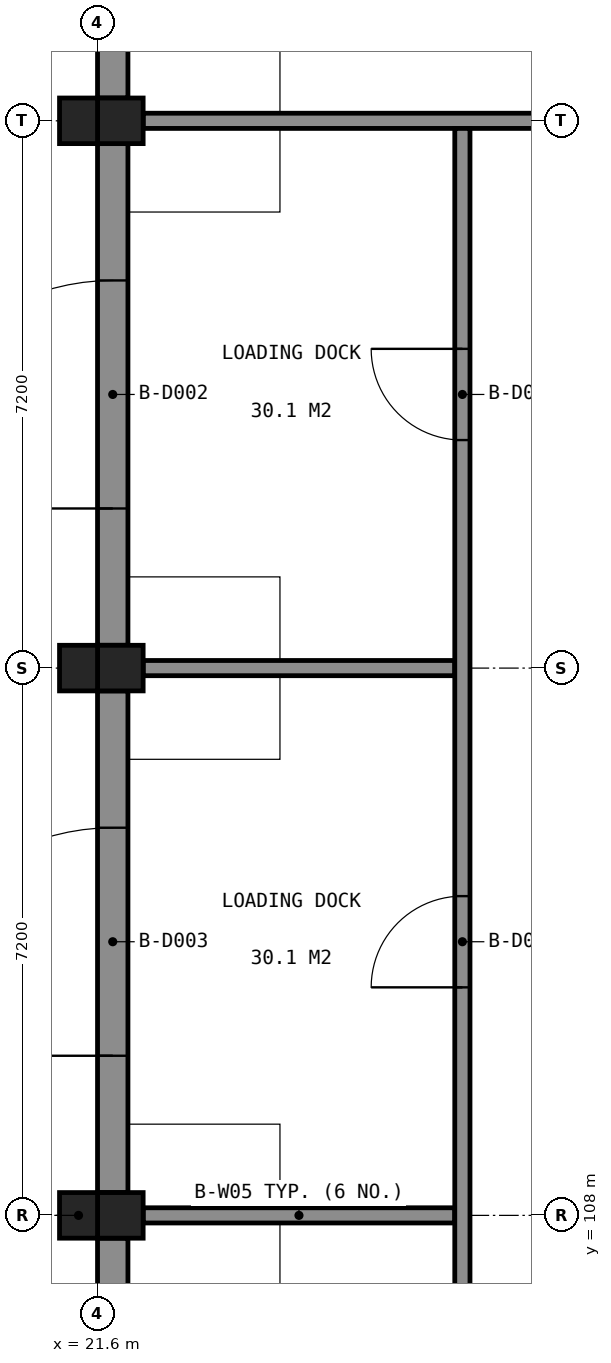
"""IFC4 building model, lengths in metres.
Left out: names, types, materials, properties, quantities, classifications, styles, units other than length and angle.
Written with IfcOpenShell. Run it as: python <this file> out.ifc"""

import sys

from ifc_helpers import new_model, si_unit, direction, frame, frame_2d, origin, origin_2d, place, context, subcontext, project, spatial, rectangle, extrude, element, fill, save


model = new_model("IFC4")
c1 = context("Model", 3, precision=1e-05, world=origin(), true_north=direction((0.0, 1.0)))
c2 = subcontext(c1, "Body", "Model", "MODEL_VIEW")
j1 = project(units=[si_unit("LENGTHUNIT", "METRE"), si_unit("PLANEANGLEUNIT", "RADIAN")], contexts=[c1])
p1 = place(None, origin())
s1 = spatial("IfcSite", under=j1, at=p1, CompositionType="ELEMENT")
p2 = place(p1, origin())
s2 = spatial("IfcBuilding", under=s1, at=p2, CompositionType="ELEMENT")
p3 = place(p2, origin())
s3 = spatial("IfcBuildingStorey", under=s2, at=p3, CompositionType="ELEMENT", Elevation=0.0)
for number, where, z_axis, x_axis in (
    (1, (21.9, 122.4, 0.0), (0.0, 0.0, 1.0), (1.0, 0.0, 0.0)),
    (2, (21.9, 115.2, 0.0), (0.0, 0.0, 1.0), (1.0, 0.0, 0.0)),
    (3, (21.9, 108.0, 0.0), (0.0, 0.0, 1.0), (1.0, 0.0, 0.0)),
):
    element("IfcColumn", number, at=place(p3, frame(where, z_axis=z_axis, x_axis=x_axis)), inside=s3, PredefinedType="COLUMN", context=c2, shape_type="SweptSolid", body=[
        extrude(rectangle(XDim=0.6, YDim=0.6, at=origin_2d()), origin(), (0.0, 0.0, 1.0), 4.8),
    ])
p4 = place(p3, frame((21.8, 101.1, 0.0), z_axis=(0.0, 0.0, 1.0), x_axis=(0.0, 1.0, 0.0)))
e4 = element("IfcWall", 4, at=p4, inside=s3, PredefinedType="SOLIDWALL", context=c2, shape_type="SweptSolid", body=[
    extrude(rectangle(XDim=6.6, YDim=0.4, at=frame_2d((3.3, 0.0))), origin(), (0.0, 0.0, 1.0), 3.95),
])
p5 = place(p4, frame((1.8, 0.0, 0.0)))
e5 = element("IfcOpeningElement", 5, at=p5, cuts=e4, PredefinedType="OPENING", context=c2, shape_type="SweptSolid", body=[
    extrude(rectangle(XDim=3.0, YDim=3.0, at=frame_2d((1.5, 1.5))), frame((0.0, 0.21, 0.0), z_axis=(0.0, -1.0, 0.0), x_axis=(1.0, 0.0, 0.0)), (0.0, 0.0, 1.0), 0.42),
])
p6 = place(p3, frame((21.8, 108.3, 0.0), z_axis=(0.0, 0.0, 1.0), x_axis=(0.0, 1.0, 0.0)))
e6 = element("IfcWall", 6, at=p6, inside=s3, PredefinedType="SOLIDWALL", context=c2, shape_type="SweptSolid", body=[
    extrude(rectangle(XDim=6.6, YDim=0.4, at=frame_2d((3.3, 0.0))), origin(), (0.0, 0.0, 1.0), 3.95),
])
p7 = place(p6, frame((1.8, 0.0, 0.0)))
e7 = element("IfcOpeningElement", 7, at=p7, cuts=e6, PredefinedType="OPENING", context=c2, shape_type="SweptSolid", body=[
    extrude(rectangle(XDim=3.0, YDim=3.0, at=frame_2d((1.5, 1.5))), frame((0.0, 0.21, 0.0), z_axis=(0.0, -1.0, 0.0), x_axis=(1.0, 0.0, 0.0)), (0.0, 0.0, 1.0), 0.42),
])
p8 = place(p3, frame((21.8, 115.5, 0.0), z_axis=(0.0, 0.0, 1.0), x_axis=(0.0, 1.0, 0.0)))
e8 = element("IfcWall", 8, at=p8, inside=s3, PredefinedType="SOLIDWALL", context=c2, shape_type="SweptSolid", body=[
    extrude(rectangle(XDim=6.6, YDim=0.4, at=frame_2d((3.3, 0.0))), origin(), (0.0, 0.0, 1.0), 3.95),
])
p9 = place(p8, frame((1.8, 0.0, 0.0)))
e9 = element("IfcOpeningElement", 9, at=p9, cuts=e8, PredefinedType="OPENING", context=c2, shape_type="SweptSolid", body=[
    extrude(rectangle(XDim=3.0, YDim=3.0, at=frame_2d((1.5, 1.5))), frame((0.0, 0.21, 0.0), z_axis=(0.0, -1.0, 0.0), x_axis=(1.0, 0.0, 0.0)), (0.0, 0.0, 1.0), 0.42),
])
p10 = place(p3, frame((21.8, 122.7, 0.0), z_axis=(0.0, 0.0, 1.0), x_axis=(0.0, 1.0, 0.0)))
e10 = element("IfcWall", 10, at=p10, inside=s3, PredefinedType="SOLIDWALL", context=c2, shape_type="SweptSolid", body=[
    extrude(rectangle(XDim=6.3, YDim=0.4, at=frame_2d((3.15, 0.0))), origin(), (0.0, 0.0, 1.0), 3.95),
])
p11 = place(p10, frame((2.55, 0.0, 0.0)))
e11 = element("IfcOpeningElement", 11, at=p11, cuts=e10, PredefinedType="OPENING", context=c2, shape_type="SweptSolid", body=[
    extrude(rectangle(XDim=1.2, YDim=2.1, at=frame_2d((0.6, 1.05))), frame((0.0, 0.21, 0.0), z_axis=(0.0, -1.0, 0.0), x_axis=(1.0, 0.0, 0.0)), (0.0, 0.0, 1.0), 0.42),
])
p12 = place(p10, frame((0.75, 0.0, 2.0)))
e12 = element("IfcOpeningElement", 12, at=p12, cuts=e10, PredefinedType="OPENING", context=c2, shape_type="SweptSolid", body=[
    extrude(rectangle(XDim=1.2, YDim=1.5, at=frame_2d((0.6, 0.75))), frame((0.0, 0.21, 0.0), z_axis=(0.0, -1.0, 0.0), x_axis=(1.0, 0.0, 0.0)), (0.0, 0.0, 1.0), 0.42),
])
p13 = place(p10, frame((4.35, 0.0, 2.0)))
e13 = element("IfcOpeningElement", 13, at=p13, cuts=e10, PredefinedType="OPENING", context=c2, shape_type="SweptSolid", body=[
    extrude(rectangle(XDim=1.2, YDim=1.5, at=frame_2d((0.6, 0.75))), frame((0.0, 0.21, 0.0), z_axis=(0.0, -1.0, 0.0), x_axis=(1.0, 0.0, 0.0)), (0.0, 0.0, 1.0), 0.42),
])
for number, where, z_axis, x_axis in (
    (14, (21.35, 108.0, -0.25), (0.0, 0.0, 1.0), (1.0, 0.0, 0.0)),
    (15, (21.35, 115.2, -0.25), (0.0, 0.0, 1.0), (1.0, 0.0, 0.0)),
    (16, (21.35, 122.4, -0.25), (0.0, 0.0, 1.0), (1.0, 0.0, 0.0)),
):
    element("IfcColumn", number, at=place(p3, frame(where, z_axis=z_axis, x_axis=x_axis)), inside=s3, PredefinedType="COLUMN", context=c2, shape_type="SweptSolid", body=[
        extrude(rectangle(XDim=0.5, YDim=0.6, at=origin_2d()), origin(), (0.0, 0.0, 1.0), 5.05),
    ])
for number, where, z_axis, x_axis in (
    (17, (22.2, 108.0, 0.0), (0.0, 0.0, 1.0), (1.0, 0.0, 0.0)),
    (18, (22.2, 115.2, 0.0), (0.0, 0.0, 1.0), (1.0, 0.0, 0.0)),
):
    element("IfcWall", number, at=place(p3, frame(where, z_axis=z_axis, x_axis=x_axis)), inside=s3, PredefinedType="PARTITIONING", context=c2, shape_type="SweptSolid", body=[
        extrude(rectangle(XDim=4.1, YDim=0.2, at=frame_2d((2.05, 0.0))), origin(), (0.0, 0.0, 1.0), 3.95),
    ])
p14 = place(p3, frame((22.2, 122.4, 0.0), z_axis=(0.0, 0.0, 1.0), x_axis=(1.0, 0.0, 0.0)))
e19 = element("IfcWall", 19, at=p14, inside=s3, PredefinedType="PARTITIONING", context=c2, shape_type="SweptSolid", body=[
    extrude(rectangle(XDim=6.3, YDim=0.2, at=frame_2d((3.15, 0.0))), origin(), (0.0, 0.0, 1.0), 3.95),
])
p15 = place(p3, frame((26.4, 100.9, 0.0), z_axis=(0.0, 0.0, 1.0), x_axis=(0.0, 1.0, 0.0)))
e20 = element("IfcWall", 20, at=p15, inside=s3, PredefinedType="PARTITIONING", context=c2, shape_type="SweptSolid", body=[
    extrude(rectangle(XDim=21.4, YDim=0.2, at=frame_2d((10.7, 0.0))), origin(), (0.0, 0.0, 1.0), 3.95),
])
p16 = place(p15, frame((17.3, 0.0, 0.0)))
e21 = element("IfcOpeningElement", 21, at=p16, cuts=e20, PredefinedType="OPENING", context=c2, shape_type="SweptSolid", body=[
    extrude(rectangle(XDim=1.2, YDim=2.1, at=frame_2d((0.6, 1.05))), frame((0.0, 0.11, 0.0), z_axis=(0.0, -1.0, 0.0), x_axis=(1.0, 0.0, 0.0)), (0.0, 0.0, 1.0), 0.22),
])
p17 = place(p15, frame((10.1, 0.0, 0.0)))
e22 = element("IfcOpeningElement", 22, at=p17, cuts=e20, PredefinedType="OPENING", context=c2, shape_type="SweptSolid", body=[
    extrude(rectangle(XDim=1.2, YDim=2.1, at=frame_2d((0.6, 1.05))), frame((0.0, 0.11, 0.0), z_axis=(0.0, -1.0, 0.0), x_axis=(1.0, 0.0, 0.0)), (0.0, 0.0, 1.0), 0.22),
])
p18 = place(p15, frame((2.9, 0.0, 0.0)))
e23 = element("IfcOpeningElement", 23, at=p18, cuts=e20, PredefinedType="OPENING", context=c2, shape_type="SweptSolid", body=[
    extrude(rectangle(XDim=1.2, YDim=2.1, at=frame_2d((0.6, 1.05))), frame((0.0, 0.11, 0.0), z_axis=(0.0, -1.0, 0.0), x_axis=(1.0, 0.0, 0.0)), (0.0, 0.0, 1.0), 0.22),
])
p19 = place(p9, origin())
e24 = element("IfcDoor", 24, at=p19, inside=s3, OperationType="ROLLINGUP", PredefinedType="DOOR", context=c2, shape_type="SweptSolid", body=[
    extrude(rectangle(XDim=3.0, YDim=3.0, at=frame_2d((1.5, 1.5))), frame((0.0, 0.025, 0.0), z_axis=(0.0, -1.0, 0.0), x_axis=(1.0, 0.0, 0.0)), (0.0, 0.0, 1.0), 0.05),
])
fill(e9, e24)
p20 = place(p7, origin())
e25 = element("IfcDoor", 25, at=p20, inside=s3, OperationType="ROLLINGUP", PredefinedType="DOOR", context=c2, shape_type="SweptSolid", body=[
    extrude(rectangle(XDim=3.0, YDim=3.0, at=frame_2d((1.5, 1.5))), frame((0.0, 0.025, 0.0), z_axis=(0.0, -1.0, 0.0), x_axis=(1.0, 0.0, 0.0)), (0.0, 0.0, 1.0), 0.05),
])
fill(e7, e25)
p21 = place(p16, origin())
e26 = element("IfcDoor", 26, at=p21, inside=s3, OperationType="SINGLE_SWING_RIGHT", PredefinedType="DOOR", context=c2, shape_type="SweptSolid", body=[
    extrude(rectangle(XDim=1.2, YDim=2.1, at=frame_2d((0.6, 1.05))), frame((0.0, 0.025, 0.0), z_axis=(0.0, -1.0, 0.0), x_axis=(1.0, 0.0, 0.0)), (0.0, 0.0, 1.0), 0.05),
])
fill(e21, e26)
p22 = place(p17, origin())
e27 = element("IfcDoor", 27, at=p22, inside=s3, OperationType="SINGLE_SWING_LEFT", PredefinedType="DOOR", context=c2, shape_type="SweptSolid", body=[
    extrude(rectangle(XDim=1.2, YDim=2.1, at=frame_2d((0.6, 1.05))), frame((0.0, 0.025, 0.0), z_axis=(0.0, -1.0, 0.0), x_axis=(1.0, 0.0, 0.0)), (0.0, 0.0, 1.0), 0.05),
])
fill(e22, e27)
save(model, sys.argv[1])
